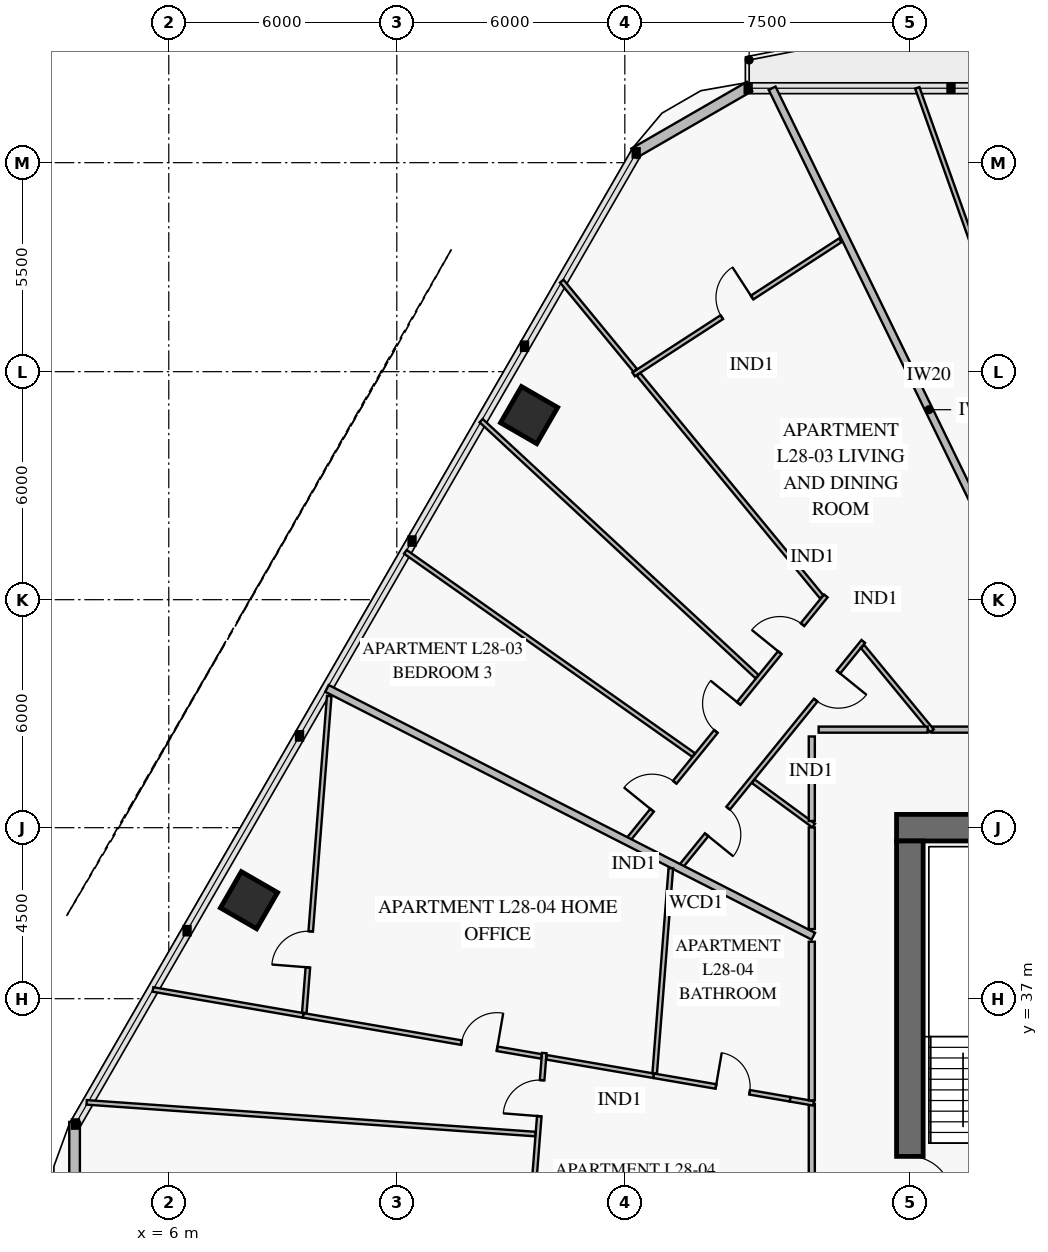
"""IFC4 building model, lengths in metres.
Left out: names, types, materials, properties, quantities, classifications, styles, units other than length and angle.
Written with IfcOpenShell. Run it as: python <this file> out.ifc"""

import sys

from ifc_helpers import new_model, si_unit, direction, frame, frame_2d, origin, origin_2d, place, context, subcontext, project, spatial, rectangle, extrude, element, fill, save


model = new_model("IFC4")
c1 = context("Model", 3, precision=1e-05, world=origin(), true_north=direction((0.0, 1.0)))
c2 = subcontext(c1, "Body", "Model", "MODEL_VIEW")
j1 = project(units=[si_unit("LENGTHUNIT", "METRE"), si_unit("PLANEANGLEUNIT", "RADIAN")], contexts=[c1])
p1 = place(None, origin())
s1 = spatial("IfcSite", under=j1, at=p1, CompositionType="ELEMENT")
p2 = place(p1, origin())
s2 = spatial("IfcBuilding", under=s1, at=p2, CompositionType="ELEMENT")
p3 = place(p2, frame((0.0, 0.0, 115.2)))
s3 = spatial("IfcBuildingStorey", under=s2, at=p3, CompositionType="ELEMENT", Elevation=115.2)
p4 = place(p3, frame((36.75, 41.5, 0.0), z_axis=(0.0, 0.0, 1.0), x_axis=(-1.0, 0.0, 0.0)))
e1 = element("IfcWall", 1, at=p4, inside=s3, PredefinedType="SHEAR", context=c2, shape_type="SweptSolid", body=[
    extrude(rectangle(XDim=11.6, YDim=0.7, at=frame_2d((5.8, 0.0))), origin(), (0.0, 0.0, 1.0), 3.8),
])
p5 = place(p4, frame((4.25, 0.0, 0.0)))
e2 = element("IfcOpeningElement", 2, at=p5, cuts=e1, PredefinedType="OPENING", context=c2, shape_type="SweptSolid", body=[
    extrude(rectangle(XDim=1.1, YDim=2.15, at=frame_2d((0.55, 1.075))), frame((0.0, 0.362, 0.0), z_axis=(0.0, -1.0, 0.0), x_axis=(1.0, 0.0, 0.0)), (0.0, 0.0, 1.0), 0.724),
])
p6 = place(p3, frame((25.5, 22.85, 0.0), z_axis=(0.0, 0.0, 1.0), x_axis=(0.0, 1.0, 0.0)))
e3 = element("IfcWall", 3, at=p6, inside=s3, PredefinedType="SHEAR", context=c2, shape_type="SweptSolid", body=[
    extrude(rectangle(XDim=18.3, YDim=0.7, at=frame_2d((9.15, 0.0))), origin(), (0.0, 0.0, 1.0), 3.8),
])
p7 = place(p6, frame((8.9, 0.0, 0.0)))
e4 = element("IfcOpeningElement", 4, at=p7, cuts=e3, PredefinedType="OPENING", context=c2, shape_type="SweptSolid", body=[
    extrude(rectangle(XDim=1.1, YDim=2.15, at=frame_2d((0.55, 1.075))), frame((0.0, 0.362, 0.0), z_axis=(0.0, -1.0, 0.0), x_axis=(1.0, 0.0, 0.0)), (0.0, 0.0, 1.0), 0.724),
])
for number, where, z_axis, x_axis in (
    (5, (15.481, 52.357, 0.0), (0.0, 0.0, 1.0), (-0.5, -0.866, 0.0)),
    (6, (8.111, 39.592, 0.0), (0.0, 0.0, 1.0), (-0.5, -0.866, 0.0)),
):
    element("IfcColumn", number, at=place(p3, frame(where, z_axis=z_axis, x_axis=x_axis)), inside=s3, PredefinedType="COLUMN", context=c2, shape_type="SweptSolid", body=[
        extrude(rectangle(XDim=1.1, YDim=1.1, at=origin_2d()), origin(), (0.0, 0.0, 1.0), 3.55),
    ])
p8 = place(p3, frame((3.521, 30.242, 0.0), z_axis=(0.0, 0.0, 1.0), x_axis=(0.0, 1.0, 0.0)))
e7 = element("IfcWall", 7, at=p8, inside=s3, PredefinedType="SOLIDWALL", context=c2, shape_type="SweptSolid", body=[
    extrude(rectangle(XDim=3.515, YDim=0.28, at=frame_2d((1.758, 0.0))), origin(), (0.0, 0.0, 1.0), 3.55),
])
p9 = place(p3, frame((18.239, 59.249, 0.0), z_axis=(0.0, 0.0, 1.0), x_axis=(0.866007452331, 0.500031091541, 0.0)))
e8 = element("IfcWall", 8, at=p9, inside=s3, PredefinedType="SOLIDWALL", context=c2, shape_type="SweptSolid", body=[
    extrude(rectangle(XDim=3.515, YDim=0.28, at=frame_2d((1.757, 0.0))), origin(), (0.0, 0.0, 1.0), 3.55),
])
p10 = place(p3, frame((23.669, 56.957, 0.0), z_axis=(0.0, 0.0, 1.0), x_axis=(-0.838859022157, -0.544348731005, 0.0)))
e9 = element("IfcWall", 9, at=p10, inside=s3, PredefinedType="PARTITIONING", context=c2, shape_type="SweptSolid", body=[
    extrude(rectangle(XDim=6.482, YDim=0.12, at=frame_2d((3.241, 0.0))), origin(), (0.0, 0.0, 1.0), 2.8),
])
p11 = place(p10, frame((2.766, 0.0, 0.0)))
e10 = element("IfcOpeningElement", 10, at=p11, cuts=e9, PredefinedType="OPENING", context=c2, shape_type="SweptSolid", body=[
    extrude(rectangle(XDim=0.95, YDim=2.1, at=frame_2d((0.475, 1.05))), frame((0.0, 0.072, 0.0), z_axis=(0.0, -1.0, 0.0), x_axis=(1.0, 0.0, 0.0)), (0.0, 0.0, 1.0), 0.144),
])
p12 = place(p3, frame((24.275, 46.402, 0.0), z_axis=(0.0, 0.0, 1.0), x_axis=(-0.629602187024, -0.776917682959, 0.0)))
e11 = element("IfcWall", 11, at=p12, inside=s3, PredefinedType="PARTITIONING", context=c2, shape_type="SweptSolid", body=[
    extrude(rectangle(XDim=7.614, YDim=0.12, at=frame_2d((3.807, 0.0))), origin(), (0.0, 0.0, 1.0), 2.85),
])
p13 = place(p12, frame((1.038, 0.0, 0.0)))
e12 = element("IfcOpeningElement", 12, at=p13, cuts=e11, PredefinedType="OPENING", context=c2, shape_type="SweptSolid", body=[
    extrude(rectangle(XDim=0.95, YDim=2.1, at=frame_2d((0.475, 1.05))), frame((0.0, 0.072, 0.0), z_axis=(0.0, -1.0, 0.0), x_axis=(1.0, 0.0, 0.0)), (0.0, 0.0, 1.0), 0.144),
])
p14 = place(p12, frame((5.648, 0.0, 0.0)))
e13 = element("IfcOpeningElement", 13, at=p14, cuts=e11, PredefinedType="OPENING", context=c2, shape_type="SweptSolid", body=[
    extrude(rectangle(XDim=0.9, YDim=2.1, at=frame_2d((0.45, 1.05))), frame((0.0, 0.072, 0.0), z_axis=(0.0, -1.0, 0.0), x_axis=(1.0, 0.0, 0.0)), (0.0, 0.0, 1.0), 0.144),
])
p15 = place(p3, frame((23.289, 47.599, 0.0), z_axis=(0.0, 0.0, 1.0), x_axis=(-0.629618678783, -0.776904318001, 0.0)))
e14 = element("IfcWall", 14, at=p15, inside=s3, PredefinedType="PARTITIONING", context=c2, shape_type="SweptSolid", body=[
    extrude(rectangle(XDim=8.233, YDim=0.12, at=frame_2d((4.117, 0.0))), origin(), (0.0, 0.0, 1.0), 2.85),
])
p16 = place(p15, frame((0.972, 0.0, 0.0)))
e15 = element("IfcOpeningElement", 15, at=p16, cuts=e14, PredefinedType="OPENING", context=c2, shape_type="SweptSolid", body=[
    extrude(rectangle(XDim=0.95, YDim=2.1, at=frame_2d((0.475, 1.05))), frame((0.0, 0.072, 0.0), z_axis=(0.0, -1.0, 0.0), x_axis=(1.0, 0.0, 0.0)), (0.0, 0.0, 1.0), 0.144),
])
p17 = place(p15, frame((3.642, 0.0, 0.0)))
e16 = element("IfcOpeningElement", 16, at=p17, cuts=e14, PredefinedType="OPENING", context=c2, shape_type="SweptSolid", body=[
    extrude(rectangle(XDim=0.95, YDim=2.1, at=frame_2d((0.475, 1.05))), frame((0.0, 0.072, 0.0), z_axis=(0.0, -1.0, 0.0), x_axis=(1.0, 0.0, 0.0)), (0.0, 0.0, 1.0), 0.144),
])
p18 = place(p15, frame((6.311, 0.0, 0.0)))
e17 = element("IfcOpeningElement", 17, at=p18, cuts=e14, PredefinedType="OPENING", context=c2, shape_type="SweptSolid", body=[
    extrude(rectangle(XDim=0.95, YDim=2.1, at=frame_2d((0.475, 1.05))), frame((0.0, 0.072, 0.0), z_axis=(0.0, -1.0, 0.0), x_axis=(1.0, 0.0, 0.0)), (0.0, 0.0, 1.0), 0.144),
])
p19 = place(p3, frame((29.955, 44.08, 0.0), z_axis=(0.0, 0.0, 1.0), x_axis=(-1.0, 0.0, 0.0)))
e18 = element("IfcWall", 18, at=p19, inside=s3, PredefinedType="PARTITIONING", context=c2, shape_type="SweptSolid", body=[
    extrude(rectangle(XDim=3.873, YDim=0.16, at=frame_2d((1.937, 0.0))), origin(), (0.0, 0.0, 1.0), 3.55),
])
p20 = place(p19, frame((1.411, 0.0, 0.0)))
e19 = element("IfcOpeningElement", 19, at=p20, cuts=e18, PredefinedType="OPENING", context=c2, shape_type="SweptSolid", body=[
    extrude(rectangle(XDim=1.05, YDim=2.15, at=frame_2d((0.525, 1.075))), frame((0.0, 0.092, 0.0), z_axis=(0.0, -1.0, 0.0), x_axis=(1.0, 0.0, 0.0)), (0.0, 0.0, 1.0), 0.184),
])
p21 = place(p3, frame((15.88, 35.57, 0.0), z_axis=(0.0, 0.0, 1.0), x_axis=(-0.078466415581, -0.996916757621, 0.0)))
e20 = element("IfcWall", 20, at=p21, inside=s3, PredefinedType="PARTITIONING", context=c2, shape_type="SweptSolid", body=[
    extrude(rectangle(XDim=10.305, YDim=0.12, at=frame_2d((5.152, 0.0))), origin(), (0.0, 0.0, 1.0), 2.85),
])
p22 = place(p21, frame((0.717, 0.0, 0.0)))
e21 = element("IfcOpeningElement", 21, at=p22, cuts=e20, PredefinedType="OPENING", context=c2, shape_type="SweptSolid", body=[
    extrude(rectangle(XDim=0.95, YDim=2.1, at=frame_2d((0.475, 1.05))), frame((0.0, 0.072, 0.0), z_axis=(0.0, -1.0, 0.0), x_axis=(1.0, 0.0, 0.0)), (0.0, 0.0, 1.0), 0.144),
])
p23 = place(p21, frame((5.629, 0.0, 0.0)))
e22 = element("IfcOpeningElement", 22, at=p23, cuts=e20, PredefinedType="OPENING", context=c2, shape_type="SweptSolid", body=[
    extrude(rectangle(XDim=0.95, YDim=2.1, at=frame_2d((0.475, 1.05))), frame((0.0, 0.072, 0.0), z_axis=(0.0, -1.0, 0.0), x_axis=(1.0, 0.0, 0.0)), (0.0, 0.0, 1.0), 0.144),
])
p24 = place(p3, frame((22.35, 34.353, 0.0), z_axis=(0.0, 0.0, 1.0), x_axis=(-0.985463207412, 0.169888983862, 0.0)))
e23 = element("IfcWall", 23, at=p24, inside=s3, PredefinedType="PARTITIONING", context=c2, shape_type="SweptSolid", body=[
    extrude(rectangle(XDim=3.647, YDim=0.12, at=frame_2d((1.824, 0.0))), origin(), (0.0, 0.0, 1.0), 3.55),
])
p25 = place(p24, frame((1.082, 0.0, 0.0)))
e24 = element("IfcOpeningElement", 24, at=p25, cuts=e23, PredefinedType="OPENING", context=c2, shape_type="SweptSolid", body=[
    extrude(rectangle(XDim=0.9, YDim=2.1, at=frame_2d((0.45, 1.05))), frame((0.0, 0.072, 0.0), z_axis=(0.0, -1.0, 0.0), x_axis=(1.0, 0.0, 0.0)), (0.0, 0.0, 1.0), 0.144),
])
p26 = place(p3, frame((18.756, 34.972, 0.0), z_axis=(0.0, 0.0, 1.0), x_axis=(-0.985473922691, 0.169826816774, 0.0)))
e25 = element("IfcWall", 25, at=p26, inside=s3, PredefinedType="PARTITIONING", context=c2, shape_type="SweptSolid", body=[
    extrude(rectangle(XDim=2.858, YDim=0.12, at=frame_2d((1.429, 0.0))), origin(), (0.0, 0.0, 1.0), 3.1),
])
p27 = place(p3, frame((15.805, 35.481, 0.0), z_axis=(0.0, 0.0, 1.0), x_axis=(-0.985468091592, 0.169860650105, 0.0)))
e26 = element("IfcWall", 26, at=p27, inside=s3, PredefinedType="PARTITIONING", context=c2, shape_type="SweptSolid", body=[
    extrude(rectangle(XDim=6.362, YDim=0.12, at=frame_2d((3.181, 0.0))), origin(), (0.0, 0.0, 1.0), 3.55),
])
p28 = place(p27, frame((1.184, 0.0, 0.0)))
e27 = element("IfcOpeningElement", 27, at=p28, cuts=e26, PredefinedType="OPENING", context=c2, shape_type="SweptSolid", body=[
    extrude(rectangle(XDim=0.95, YDim=2.1, at=frame_2d((0.475, 1.05))), frame((0.0, 0.072, 0.0), z_axis=(0.0, -1.0, 0.0), x_axis=(1.0, 0.0, 0.0)), (0.0, 0.0, 1.0), 0.144),
])
p29 = place(p3, frame((10.222, 44.964, 0.0), z_axis=(0.0, 0.0, 1.0), x_axis=(-0.078457448152, -0.996917463399, 0.0)))
e28 = element("IfcWall", 28, at=p29, inside=s3, PredefinedType="PARTITIONING", context=c2, shape_type="SweptSolid", body=[
    extrude(rectangle(XDim=8.365, YDim=0.12, at=frame_2d((4.182, 0.0))), origin(), (0.0, 0.0, 1.0), 2.8),
])
p30 = place(p29, frame((6.212, 0.0, 0.0)))
e29 = element("IfcOpeningElement", 29, at=p30, cuts=e28, PredefinedType="OPENING", context=c2, shape_type="SweptSolid", body=[
    extrude(rectangle(XDim=0.95, YDim=2.1, at=frame_2d((0.475, 1.05))), frame((0.0, 0.072, 0.0), z_axis=(0.0, -1.0, 0.0), x_axis=(1.0, 0.0, 0.0)), (0.0, 0.0, 1.0), 0.144),
])
p31 = place(p3, frame((22.92, 34.234, 0.0), z_axis=(0.0, 0.0, 1.0), x_axis=(0.0, -1.0, 0.0)))
e30 = element("IfcWall", 30, at=p31, inside=s3, PredefinedType="PARTITIONING", context=c2, shape_type="SweptSolid", body=[
    extrude(rectangle(XDim=6.337, YDim=0.16, at=frame_2d((3.169, 0.0))), origin(), (0.0, 0.0, 1.0), 2.85),
])
p32 = place(p31, frame((2.644, 0.0, 0.0)))
e31 = element("IfcOpeningElement", 31, at=p32, cuts=e30, PredefinedType="OPENING", context=c2, shape_type="SweptSolid", body=[
    extrude(rectangle(XDim=1.05, YDim=2.15, at=frame_2d((0.525, 1.075))), frame((0.0, 0.092, 0.0), z_axis=(0.0, -1.0, 0.0), x_axis=(1.0, 0.0, 0.0)), (0.0, 0.0, 1.0), 0.184),
])
p33 = place(p3, frame((30.223, 48.242, 0.0), z_axis=(0.0, 0.0, 1.0), x_axis=(-0.335110936566, 0.942178677425, 0.0)))
e32 = element("IfcWall", 32, at=p33, inside=s3, PredefinedType="PARTITIONING", context=c2, shape_type="SweptSolid", body=[
    extrude(rectangle(XDim=13.507, YDim=0.12, at=frame_2d((6.753, 0.0))), origin(), (0.0, 0.0, 1.0), 2.8),
])
p34 = place(p3, frame((30.128, 44.04, 0.0), z_axis=(0.0, 0.0, 1.0), x_axis=(-0.438372268699, 0.898793499106, 0.0)))
e33 = element("IfcWall", 33, at=p34, inside=s3, PredefinedType="PARTITIONING", context=c2, shape_type="SweptSolid", body=[
    extrude(rectangle(XDim=18.823, YDim=0.2, at=frame_2d((9.412, 0.0))), origin(), (0.0, 0.0, 1.0), 2.8),
])
p35 = place(p3, frame((22.97, 41.556, 0.0), z_axis=(0.0, 0.0, 1.0), x_axis=(-0.806432554287, 0.591326082113, 0.0)))
e34 = element("IfcWall", 34, at=p35, inside=s3, PredefinedType="PARTITIONING", context=c2, shape_type="SweptSolid", body=[
    extrude(rectangle(XDim=1.971, YDim=0.12, at=frame_2d((0.986, 0.0))), origin(), (0.0, 0.0, 1.0), 3.55),
])
p36 = place(p3, frame((21.479, 45.475, 0.0), z_axis=(0.0, 0.0, 1.0), x_axis=(-0.733013816474, 0.680213749389, 0.0)))
e35 = element("IfcWall", 35, at=p36, inside=s3, PredefinedType="PARTITIONING", context=c2, shape_type="SweptSolid", body=[
    extrude(rectangle(XDim=9.904, YDim=0.12, at=frame_2d((4.952, 0.0))), origin(), (0.0, 0.0, 1.0), 2.8),
])
p37 = place(p3, frame((19.809, 43.413, 0.0), z_axis=(0.0, 0.0, 1.0), x_axis=(-0.817344716763, 0.57614895121, 0.0)))
e36 = element("IfcWall", 36, at=p37, inside=s3, PredefinedType="PARTITIONING", context=c2, shape_type="SweptSolid", body=[
    extrude(rectangle(XDim=9.278, YDim=0.12, at=frame_2d((4.639, 0.0))), origin(), (0.0, 0.0, 1.0), 2.8),
])
p38 = place(p3, frame((26.082, 44.049, 0.0), z_axis=(0.0, 0.0, 1.0), x_axis=(-0.635546545523, 0.772062554767, 0.0)))
e37 = element("IfcWall", 37, at=p38, inside=s3, PredefinedType="PARTITIONING", context=c2, shape_type="SweptSolid", body=[
    extrude(rectangle(XDim=2.876, YDim=0.12, at=frame_2d((1.438, 0.0))), origin(), (0.0, 0.0, 1.0), 3.55),
])
p39 = place(p3, frame((23.18, 47.574, 0.0), z_axis=(0.0, 0.0, 1.0), x_axis=(-0.635541406611, 0.772066784989, 0.0)))
e38 = element("IfcWall", 38, at=p39, inside=s3, PredefinedType="PARTITIONING", context=c2, shape_type="SweptSolid", body=[
    extrude(rectangle(XDim=7.586, YDim=0.12, at=frame_2d((3.793, 0.0))), origin(), (0.0, 0.0, 1.0), 3.1),
])
p40 = place(p3, frame((18.272, 53.536, 0.0), z_axis=(0.0, 0.0, 1.0), x_axis=(-0.635518574301, 0.772085579271, 0.0)))
e39 = element("IfcWall", 39, at=p40, inside=s3, PredefinedType="PARTITIONING", context=c2, shape_type="SweptSolid", body=[
    extrude(rectangle(XDim=3.039, YDim=0.12, at=frame_2d((1.52, 0.0))), origin(), (0.0, 0.0, 1.0), 2.8),
])
p41 = place(p3, frame((22.96, 38.644, 0.0), z_axis=(0.0, 0.0, 1.0), x_axis=(-0.891012124705, 0.453979507939, 0.0)))
e40 = element("IfcWall", 40, at=p41, inside=s3, PredefinedType="PARTITIONING", context=c2, shape_type="SweptSolid", body=[
    extrude(rectangle(XDim=14.363, YDim=0.2, at=frame_2d((7.182, 0.0))), origin(), (0.0, 0.0, 1.0), 2.8),
])
p42 = place(p3, frame((15.644, 33.438, 0.0), z_axis=(0.0, 0.0, 1.0), x_axis=(-0.997515449917, 0.070448045941, 0.0)))
e41 = element("IfcWall", 41, at=p42, inside=s3, PredefinedType="PARTITIONING", context=c2, shape_type="SweptSolid", body=[
    extrude(rectangle(XDim=11.835, YDim=0.12, at=frame_2d((5.917, 0.0))), origin(), (0.0, 0.0, 1.0), 2.8),
])
p43 = place(p3, frame((22.965, 34.247, 0.0), z_axis=(0.0, 0.0, 1.0), x_axis=(-0.985457855144, 0.169920027466, 0.0)))
e42 = element("IfcWall", 42, at=p43, inside=s3, PredefinedType="PARTITIONING", context=c2, shape_type="SweptSolid", body=[
    extrude(rectangle(XDim=0.624, YDim=0.12, at=frame_2d((0.312, 0.0))), origin(), (0.0, 0.0, 1.0), 3.55),
])
p44 = place(p3, frame((9.536, 36.562, 0.0), z_axis=(0.0, 0.0, 1.0), x_axis=(-0.985463631193, 0.169886525644, 0.0)))
e43 = element("IfcWall", 43, at=p44, inside=s3, PredefinedType="PARTITIONING", context=c2, shape_type="SweptSolid", body=[
    extrude(rectangle(XDim=4.01, YDim=0.12, at=frame_2d((2.005, 0.0))), origin(), (0.0, 0.0, 1.0), 2.8),
])
p45 = place(p3, frame((19.211, 40.433, 0.0), z_axis=(0.0, 0.0, 1.0), x_axis=(-0.078465431449, -0.996916835081, 0.0)))
e44 = element("IfcWall", 44, at=p45, inside=s3, PredefinedType="PARTITIONING", context=c2, shape_type="SweptSolid", body=[
    extrude(rectangle(XDim=5.414, YDim=0.12, at=frame_2d((2.707, 0.0))), origin(), (0.0, 0.0, 1.0), 2.85),
])
p46 = place(p3, frame((25.968, 44.08, 0.0), z_axis=(0.0, 0.0, 1.0), x_axis=(-1.0, 0.0, 0.0)))
e45 = element("IfcWall", 45, at=p46, inside=s3, PredefinedType="PARTITIONING", context=c2, shape_type="SweptSolid", body=[
    extrude(rectangle(XDim=2.868, YDim=0.16, at=frame_2d((1.434, 0.0))), origin(), (0.0, 0.0, 1.0), 2.85),
])
p47 = place(p3, frame((22.92, 43.9, 0.0), z_axis=(0.0, 0.0, 1.0), x_axis=(0.0, -1.0, 0.0)))
e46 = element("IfcWall", 46, at=p47, inside=s3, PredefinedType="PARTITIONING", context=c2, shape_type="SweptSolid", body=[
    extrude(rectangle(XDim=2.223, YDim=0.16, at=frame_2d((1.112, 0.0))), origin(), (0.0, 0.0, 1.0), 3.55),
])
p48 = place(p3, frame((22.92, 41.508, 0.0), z_axis=(0.0, 0.0, 1.0), x_axis=(0.0, -1.0, 0.0)))
e47 = element("IfcWall", 47, at=p48, inside=s3, PredefinedType="PARTITIONING", context=c2, shape_type="SweptSolid", body=[
    extrude(rectangle(XDim=2.677, YDim=0.16, at=frame_2d((1.338, 0.0))), origin(), (0.0, 0.0, 1.0), 3.55),
])
p49 = place(p3, frame((22.92, 38.499, 0.0), z_axis=(0.0, 0.0, 1.0), x_axis=(0.0, -1.0, 0.0)))
e48 = element("IfcWall", 48, at=p49, inside=s3, PredefinedType="PARTITIONING", context=c2, shape_type="SweptSolid", body=[
    extrude(rectangle(XDim=4.176, YDim=0.16, at=frame_2d((2.088, 0.0))), origin(), (0.0, 0.0, 1.0), 2.85),
])
p50 = place(p7, frame((1.1, 0.0, 0.0), z_axis=(0.0, 0.0, 1.0), x_axis=(-1.0, 0.0, 0.0)))
e49 = element("IfcDoor", 49, at=p50, inside=s3, OperationType="SINGLE_SWING_RIGHT", PredefinedType="USERDEFINED", context=c2, shape_type="SweptSolid", body=[
    extrude(rectangle(XDim=1.1, YDim=2.15, at=frame_2d((0.55, 1.075))), frame((0.0, 0.025, 0.0), z_axis=(0.0, -1.0, 0.0), x_axis=(1.0, 0.0, 0.0)), (0.0, 0.0, 1.0), 0.05),
])
fill(e4, e49)
p51 = place(p11, frame((0.95, 0.0, 0.0), z_axis=(0.0, 0.0, 1.0), x_axis=(-1.0, 0.0, 0.0)))
e50 = element("IfcDoor", 50, at=p51, inside=s3, OperationType="SINGLE_SWING_RIGHT", PredefinedType="DOOR", context=c2, shape_type="SweptSolid", body=[
    extrude(rectangle(XDim=0.95, YDim=2.1, at=frame_2d((0.475, 1.05))), frame((0.0, 0.025, 0.0), z_axis=(0.0, -1.0, 0.0), x_axis=(1.0, 0.0, 0.0)), (0.0, 0.0, 1.0), 0.05),
])
fill(e10, e50)
p52 = place(p13, origin())
e51 = element("IfcDoor", 51, at=p52, inside=s3, OperationType="SINGLE_SWING_LEFT", PredefinedType="DOOR", context=c2, shape_type="SweptSolid", body=[
    extrude(rectangle(XDim=0.95, YDim=2.1, at=frame_2d((0.475, 1.05))), frame((0.0, 0.025, 0.0), z_axis=(0.0, -1.0, 0.0), x_axis=(1.0, 0.0, 0.0)), (0.0, 0.0, 1.0), 0.05),
])
fill(e12, e51)
p53 = place(p14, origin())
e52 = element("IfcDoor", 52, at=p53, inside=s3, OperationType="SINGLE_SWING_RIGHT", PredefinedType="DOOR", context=c2, shape_type="SweptSolid", body=[
    extrude(rectangle(XDim=0.9, YDim=2.1, at=frame_2d((0.45, 1.05))), frame((0.0, 0.025, 0.0), z_axis=(0.0, -1.0, 0.0), x_axis=(1.0, 0.0, 0.0)), (0.0, 0.0, 1.0), 0.05),
])
fill(e13, e52)
p54 = place(p16, frame((0.95, 0.0, 0.0), z_axis=(0.0, 0.0, 1.0), x_axis=(-1.0, 0.0, 0.0)))
e53 = element("IfcDoor", 53, at=p54, inside=s3, OperationType="SINGLE_SWING_LEFT", PredefinedType="DOOR", context=c2, shape_type="SweptSolid", body=[
    extrude(rectangle(XDim=0.95, YDim=2.1, at=frame_2d((0.475, 1.05))), frame((0.0, 0.025, 0.0), z_axis=(0.0, -1.0, 0.0), x_axis=(1.0, 0.0, 0.0)), (0.0, 0.0, 1.0), 0.05),
])
fill(e15, e53)
p55 = place(p17, frame((0.95, 0.0, 0.0), z_axis=(0.0, 0.0, 1.0), x_axis=(-1.0, 0.0, 0.0)))
e54 = element("IfcDoor", 54, at=p55, inside=s3, OperationType="SINGLE_SWING_RIGHT", PredefinedType="DOOR", context=c2, shape_type="SweptSolid", body=[
    extrude(rectangle(XDim=0.95, YDim=2.1, at=frame_2d((0.475, 1.05))), frame((0.0, 0.025, 0.0), z_axis=(0.0, -1.0, 0.0), x_axis=(1.0, 0.0, 0.0)), (0.0, 0.0, 1.0), 0.05),
])
fill(e16, e54)
p56 = place(p18, frame((0.95, 0.0, 0.0), z_axis=(0.0, 0.0, 1.0), x_axis=(-1.0, 0.0, 0.0)))
e55 = element("IfcDoor", 55, at=p56, inside=s3, OperationType="SINGLE_SWING_LEFT", PredefinedType="DOOR", context=c2, shape_type="SweptSolid", body=[
    extrude(rectangle(XDim=0.95, YDim=2.1, at=frame_2d((0.475, 1.05))), frame((0.0, 0.025, 0.0), z_axis=(0.0, -1.0, 0.0), x_axis=(1.0, 0.0, 0.0)), (0.0, 0.0, 1.0), 0.05),
])
fill(e17, e55)
p57 = place(p22, frame((0.95, 0.0, 0.0), z_axis=(0.0, 0.0, 1.0), x_axis=(-1.0, 0.0, 0.0)))
e56 = element("IfcDoor", 56, at=p57, inside=s3, OperationType="SINGLE_SWING_LEFT", PredefinedType="DOOR", context=c2, shape_type="SweptSolid", body=[
    extrude(rectangle(XDim=0.95, YDim=2.1, at=frame_2d((0.475, 1.05))), frame((0.0, 0.025, 0.0), z_axis=(0.0, -1.0, 0.0), x_axis=(1.0, 0.0, 0.0)), (0.0, 0.0, 1.0), 0.05),
])
fill(e21, e56)
p58 = place(p25, frame((0.9, 0.0, 0.0), z_axis=(0.0, 0.0, 1.0), x_axis=(-1.0, 0.0, 0.0)))
e57 = element("IfcDoor", 57, at=p58, inside=s3, OperationType="SINGLE_SWING_LEFT", PredefinedType="DOOR", context=c2, shape_type="SweptSolid", body=[
    extrude(rectangle(XDim=0.9, YDim=2.1, at=frame_2d((0.45, 1.05))), frame((0.0, 0.025, 0.0), z_axis=(0.0, -1.0, 0.0), x_axis=(1.0, 0.0, 0.0)), (0.0, 0.0, 1.0), 0.05),
])
fill(e24, e57)
p59 = place(p28, frame((0.95, 0.0, 0.0), z_axis=(0.0, 0.0, 1.0), x_axis=(-1.0, 0.0, 0.0)))
e58 = element("IfcDoor", 58, at=p59, inside=s3, OperationType="SINGLE_SWING_RIGHT", PredefinedType="DOOR", context=c2, shape_type="SweptSolid", body=[
    extrude(rectangle(XDim=0.95, YDim=2.1, at=frame_2d((0.475, 1.05))), frame((0.0, 0.025, 0.0), z_axis=(0.0, -1.0, 0.0), x_axis=(1.0, 0.0, 0.0)), (0.0, 0.0, 1.0), 0.05),
])
fill(e27, e58)
p60 = place(p30, frame((0.95, 0.0, 0.0), z_axis=(0.0, 0.0, 1.0), x_axis=(-1.0, 0.0, 0.0)))
e59 = element("IfcDoor", 59, at=p60, inside=s3, OperationType="SINGLE_SWING_LEFT", PredefinedType="DOOR", context=c2, shape_type="SweptSolid", body=[
    extrude(rectangle(XDim=0.95, YDim=2.1, at=frame_2d((0.475, 1.05))), frame((0.0, 0.025, 0.0), z_axis=(0.0, -1.0, 0.0), x_axis=(1.0, 0.0, 0.0)), (0.0, 0.0, 1.0), 0.05),
])
fill(e29, e59)
save(model, sys.argv[1])
